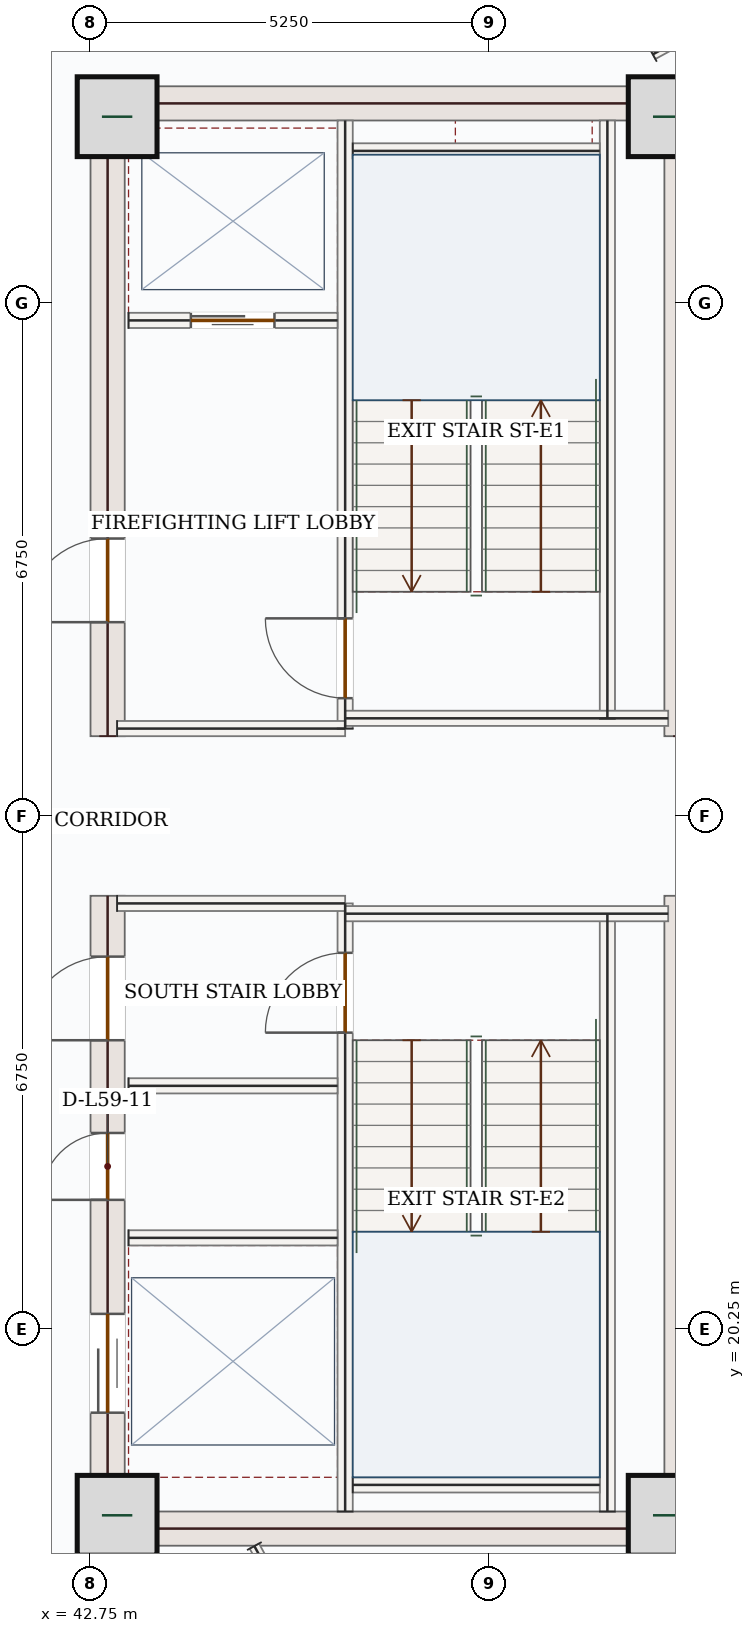
"""IFC4 building model, lengths in metres.
Left out: names, types, materials, properties, quantities, classifications, styles, units other than length and angle.
Written with IfcOpenShell. Run it as: python <this file> out.ifc"""

import sys

from ifc_helpers import new_model, si_unit, direction, frame, frame_2d, origin, origin_2d, place, context, subcontext, project, spatial, rectangle, extrude, source, transform, mapped, element, fill, save


model = new_model("IFC4")
c1 = context("Model", 3, precision=1e-05, world=origin(), true_north=direction((0.0, 1.0)))
c2 = subcontext(c1, "Body", "Model", "MODEL_VIEW")
j1 = project(units=[si_unit("LENGTHUNIT", "METRE"), si_unit("PLANEANGLEUNIT", "RADIAN")], contexts=[c1])
p1 = place(None, origin())
s1 = spatial("IfcSite", under=j1, at=p1, CompositionType="ELEMENT")
p2 = place(p1, origin())
s2 = spatial("IfcBuilding", under=s1, at=p2, CompositionType="ELEMENT")
p3 = place(p2, frame((0.0, 0.0, 250.35)))
s3 = spatial("IfcBuildingStorey", under=s2, at=p3, CompositionType="ELEMENT", Elevation=250.35)
p4 = place(p3, frame((42.975, 17.4, 0.0), z_axis=(0.0, 0.0, 1.0), x_axis=(0.0, 1.0, 0.0)))
e1 = element("IfcWall", 1, at=p4, inside=s3, PredefinedType="SHEAR", context=c2, shape_type="SweptSolid", body=[
    extrude(rectangle(XDim=8.55, YDim=0.45, at=frame_2d((4.275, 0.0))), origin(), (0.0, 0.0, 1.0), 3.5),
])
p5 = place(p4, frame((6.65, 0.0, 0.0)))
e2 = element("IfcOpeningElement", 2, at=p5, cuts=e1, PredefinedType="OPENING", context=c2, shape_type="SweptSolid", body=[
    extrude(rectangle(XDim=1.1, YDim=2.2, at=frame_2d((0.55, 1.1))), frame((0.0, 0.235, 0.0), z_axis=(0.0, -1.0, 0.0), x_axis=(1.0, 0.0, 0.0)), (0.0, 0.0, 1.0), 0.47),
])
p6 = place(p4, frame((1.75, 0.0, 0.0)))
e3 = element("IfcOpeningElement", 3, at=p6, cuts=e1, PredefinedType="OPENING", context=c2, shape_type="SweptSolid", body=[
    extrude(rectangle(XDim=1.3, YDim=2.2, at=frame_2d((0.65, 1.1))), frame((0.0, 0.235, 0.0), z_axis=(0.0, -1.0, 0.0), x_axis=(1.0, 0.0, 0.0)), (0.0, 0.0, 1.0), 0.47),
])
p7 = place(p4, frame((4.55, 0.0, 0.0)))
e4 = element("IfcOpeningElement", 4, at=p7, cuts=e1, PredefinedType="OPENING", context=c2, shape_type="SweptSolid", body=[
    extrude(rectangle(XDim=0.88, YDim=2.1, at=frame_2d((0.44, 1.05))), frame((0.0, 0.235, 0.0), z_axis=(0.0, -1.0, 0.0), x_axis=(1.0, 0.0, 0.0)), (0.0, 0.0, 1.0), 0.47),
])
p8 = place(p3, frame((42.975, 28.05, 0.0), z_axis=(0.0, 0.0, 1.0), x_axis=(0.0, 1.0, 0.0)))
e5 = element("IfcWall", 5, at=p8, inside=s3, PredefinedType="SHEAR", context=c2, shape_type="SweptSolid", body=[
    extrude(rectangle(XDim=8.55, YDim=0.45, at=frame_2d((4.275, 0.0))), origin(), (0.0, 0.0, 1.0), 3.5),
])
p9 = place(p8, frame((1.5, 0.0, 0.0)))
e6 = element("IfcOpeningElement", 6, at=p9, cuts=e5, PredefinedType="OPENING", context=c2, shape_type="SweptSolid", body=[
    extrude(rectangle(XDim=1.1, YDim=2.2, at=frame_2d((0.55, 1.1))), frame((0.0, 0.235, 0.0), z_axis=(0.0, -1.0, 0.0), x_axis=(1.0, 0.0, 0.0)), (0.0, 0.0, 1.0), 0.47),
])
m1 = source(origin(), c2, "Body", "SweptSolid", [
    extrude(rectangle(XDim=8.55, YDim=0.45, at=frame_2d((4.275, 0.0))), origin(), (0.0, 0.0, 1.0), 3.5),
])
for number, where, z_axis, x_axis in (
    (7, (50.525, 17.4, 0.0), (0.0, 0.0, 1.0), (0.0, 1.0, 0.0)),
    (8, (50.525, 28.05, 0.0), (0.0, 0.0, 1.0), (0.0, 1.0, 0.0)),
):
    element("IfcWall", number, at=place(p3, frame(where, z_axis=z_axis, x_axis=x_axis)), inside=s3, PredefinedType="SHEAR", context=c2, shape_type="MappedRepresentation", body=[
        mapped(m1, transform((0.0, 0.0, 0.0), x_axis=(1.0, 0.0, 0.0), y_axis=(0.0, 1.0, 0.0), z_axis=(0.0, 0.0, 1.0), scale=1.0)),
    ])
m2 = source(origin(), c2, "Body", "SweptSolid", [
    extrude(rectangle(XDim=7.1, YDim=0.45, at=frame_2d((3.55, 0.0))), origin(), (0.0, 0.0, 1.0), 3.5),
])
for number, where, z_axis, x_axis in (
    (9, (43.2, 17.625, 0.0), (0.0, 0.0, 1.0), (1.0, 0.0, 0.0)),
    (10, (43.2, 36.375, 0.0), (0.0, 0.0, 1.0), (1.0, 0.0, 0.0)),
):
    element("IfcWall", number, at=place(p3, frame(where, z_axis=z_axis, x_axis=x_axis)), inside=s3, PredefinedType="SHEAR", context=c2, shape_type="MappedRepresentation", body=[
        mapped(m2, transform((0.0, 0.0, 0.0), x_axis=(1.0, 0.0, 0.0), y_axis=(0.0, 1.0, 0.0), z_axis=(0.0, 0.0, 1.0), scale=1.0)),
    ])
m3 = source(origin(), c2, "Body", "SweptSolid", [
    extrude(rectangle(XDim=1.05, YDim=1.05, at=origin_2d()), origin(), (0.0, 0.0, 1.0), 3.75),
])
for number, where, z_axis, x_axis in (
    (11, (43.1, 17.8, 0.0), (0.0, 0.0, 1.0), (1.0, 0.0, 0.0)),
    (12, (50.35, 17.8, 0.0), (0.0, 0.0, 1.0), (1.0, 0.0, 0.0)),
    (13, (43.1, 36.2, 0.0), (0.0, 0.0, 1.0), (1.0, 0.0, 0.0)),
    (14, (50.35, 36.2, 0.0), (0.0, 0.0, 1.0), (1.0, 0.0, 0.0)),
):
    element("IfcColumn", number, at=place(p3, frame(where, z_axis=z_axis, x_axis=x_axis)), inside=s3, PredefinedType="COLUMN", context=c2, shape_type="MappedRepresentation", body=[
        mapped(m3, transform((0.0, 0.0, 0.0), x_axis=(1.0, 0.0, 0.0), y_axis=(0.0, 1.0, 0.0), z_axis=(0.0, 0.0, 1.0), scale=1.0)),
    ])
p10 = place(p3, frame((53.06, 18.458, 0.0), z_axis=(0.0, 0.0, 1.0), x_axis=(-0.707106781187, -0.707106781187, 0.0)))
e15 = element("IfcWall", 15, at=p10, inside=s3, PredefinedType="SOLIDWALL", context=c2, shape_type="SweptSolid", body=[
    extrude(rectangle(XDim=4.394, YDim=0.28, at=frame_2d((2.197, 0.0))), origin(), (0.0, 0.0, 1.0), 3.5),
])
p11 = place(p10, frame((1.447, 0.0, 0.85)))
e16 = element("IfcOpeningElement", 16, at=p11, cuts=e15, PredefinedType="OPENING", context=c2, shape_type="SweptSolid", body=[
    extrude(rectangle(XDim=1.5, YDim=1.5, at=frame_2d((0.75, 0.75))), frame((0.0, 0.15, 0.0), z_axis=(0.0, -1.0, 0.0), x_axis=(1.0, 0.0, 0.0)), (0.0, 0.0, 1.0), 0.3),
])
m4 = source(origin(), c2, "Body", "SweptSolid", [
    extrude(rectangle(XDim=7.87, YDim=0.2, at=frame_2d((3.935, 0.0))), origin(), (0.0, 0.0, 1.0), 3.5),
])
for number, where, z_axis, x_axis in (
    (17, (49.55, 17.85, 0.0), (0.0, 0.0, 1.0), (0.0, 1.0, 0.0)),
    (18, (49.55, 28.28, 0.0), (0.0, 0.0, 1.0), (0.0, 1.0, 0.0)),
):
    element("IfcWall", number, at=place(p3, frame(where, z_axis=z_axis, x_axis=x_axis)), inside=s3, PredefinedType="SOLIDWALL", context=c2, shape_type="MappedRepresentation", body=[
        mapped(m4, transform((0.0, 0.0, 0.0), x_axis=(1.0, 0.0, 0.0), y_axis=(0.0, 1.0, 0.0), z_axis=(0.0, 0.0, 1.0), scale=1.0)),
    ])
p12 = place(p3, frame((46.1, 17.85, 0.0), z_axis=(0.0, 0.0, 1.0), x_axis=(0.0, 1.0, 0.0)))
e19 = element("IfcWall", 19, at=p12, inside=s3, PredefinedType="SOLIDWALL", context=c2, shape_type="SweptSolid", body=[
    extrude(rectangle(XDim=8.0, YDim=0.2, at=frame_2d((4.0, 0.0))), origin(), (0.0, 0.0, 1.0), 3.5),
])
p13 = place(p12, frame((6.3, 0.0, 0.0)))
e20 = element("IfcOpeningElement", 20, at=p13, cuts=e19, PredefinedType="OPENING", context=c2, shape_type="SweptSolid", body=[
    extrude(rectangle(XDim=1.05, YDim=2.15, at=frame_2d((0.525, 1.075))), frame((0.0, 0.11, 0.0), z_axis=(0.0, -1.0, 0.0), x_axis=(1.0, 0.0, 0.0)), (0.0, 0.0, 1.0), 0.22),
])
p14 = place(p3, frame((46.1, 28.15, 0.0), z_axis=(0.0, 0.0, 1.0), x_axis=(0.0, 1.0, 0.0)))
e21 = element("IfcWall", 21, at=p14, inside=s3, PredefinedType="SOLIDWALL", context=c2, shape_type="SweptSolid", body=[
    extrude(rectangle(XDim=8.0, YDim=0.2, at=frame_2d((4.0, 0.0))), origin(), (0.0, 0.0, 1.0), 3.5),
])
p15 = place(p14, frame((0.4, 0.0, 0.0)))
e22 = element("IfcOpeningElement", 22, at=p15, cuts=e21, PredefinedType="OPENING", context=c2, shape_type="SweptSolid", body=[
    extrude(rectangle(XDim=1.05, YDim=2.15, at=frame_2d((0.525, 1.075))), frame((0.0, 0.11, 0.0), z_axis=(0.0, -1.0, 0.0), x_axis=(1.0, 0.0, 0.0)), (0.0, 0.0, 1.0), 0.22),
])
m5 = source(origin(), c2, "Body", "SweptSolid", [
    extrude(rectangle(XDim=3.0, YDim=0.2, at=frame_2d((1.5, 0.0))), origin(), (0.0, 0.0, 1.0), 3.5),
])
p16 = place(p3, frame((43.1, 25.85, 0.0), z_axis=(0.0, 0.0, 1.0), x_axis=(1.0, 0.0, 0.0)))
e23 = element("IfcWall", 23, at=p16, inside=s3, PredefinedType="SOLIDWALL", context=c2, shape_type="MappedRepresentation", body=[
    mapped(m5, transform((0.0, 0.0, 0.0), x_axis=(1.0, 0.0, 0.0), y_axis=(0.0, 1.0, 0.0), z_axis=(0.0, 0.0, 1.0), scale=1.0)),
])
m6 = source(origin(), c2, "Body", "SweptSolid", [
    extrude(rectangle(XDim=4.25, YDim=0.2, at=frame_2d((2.125, 0.0))), origin(), (0.0, 0.0, 1.0), 3.5),
])
p17 = place(p3, frame((46.1, 25.715, 0.0), z_axis=(0.0, 0.0, 1.0), x_axis=(1.0, 0.0, 0.0)))
e24 = element("IfcWall", 24, at=p17, inside=s3, PredefinedType="SOLIDWALL", context=c2, shape_type="MappedRepresentation", body=[
    mapped(m6, transform((0.0, 0.0, 0.0), x_axis=(1.0, 0.0, 0.0), y_axis=(0.0, 1.0, 0.0), z_axis=(0.0, 0.0, 1.0), scale=1.0)),
])
p18 = place(p3, frame((43.1, 28.15, 0.0), z_axis=(0.0, 0.0, 1.0), x_axis=(1.0, 0.0, 0.0)))
e25 = element("IfcWall", 25, at=p18, inside=s3, PredefinedType="SOLIDWALL", context=c2, shape_type="MappedRepresentation", body=[
    mapped(m5, transform((0.0, 0.0, 0.0), x_axis=(1.0, 0.0, 0.0), y_axis=(0.0, 1.0, 0.0), z_axis=(0.0, 0.0, 1.0), scale=1.0)),
])
p19 = place(p3, frame((46.1, 28.285, 0.0), z_axis=(0.0, 0.0, 1.0), x_axis=(1.0, 0.0, 0.0)))
e26 = element("IfcWall", 26, at=p19, inside=s3, PredefinedType="SOLIDWALL", context=c2, shape_type="MappedRepresentation", body=[
    mapped(m6, transform((0.0, 0.0, 0.0), x_axis=(1.0, 0.0, 0.0), y_axis=(0.0, 1.0, 0.0), z_axis=(0.0, 0.0, 1.0), scale=1.0)),
])
m7 = source(origin(), c2, "Body", "SweptSolid", [
    extrude(rectangle(XDim=3.25, YDim=0.2, at=frame_2d((1.625, 0.0))), origin(), (0.0, 0.0, 1.0), 3.5),
])
for number, where, z_axis, x_axis in (
    (27, (46.2, 35.75, 0.0), (0.0, 0.0, 1.0), (1.0, 0.0, 0.0)),
    (28, (46.2, 18.2, 0.0), (0.0, 0.0, 1.0), (1.0, 0.0, 0.0)),
):
    element("IfcWall", number, at=place(p3, frame(where, z_axis=z_axis, x_axis=x_axis)), inside=s3, PredefinedType="SOLIDWALL", context=c2, shape_type="MappedRepresentation", body=[
        mapped(m7, transform((0.0, 0.0, 0.0), x_axis=(1.0, 0.0, 0.0), y_axis=(0.0, 1.0, 0.0), z_axis=(0.0, 0.0, 1.0), scale=1.0)),
    ])
p20 = place(p3, frame((43.25, 33.52, 0.0), z_axis=(0.0, 0.0, 1.0), x_axis=(1.0, 0.0, 0.0)))
e29 = element("IfcWall", 29, at=p20, inside=s3, PredefinedType="SOLIDWALL", context=c2, shape_type="SweptSolid", body=[
    extrude(rectangle(XDim=2.75, YDim=0.2, at=frame_2d((1.375, 0.0))), origin(), (0.0, 0.0, 1.0), 3.5),
])
p21 = place(p20, frame((0.82, 0.0, 0.0)))
e30 = element("IfcOpeningElement", 30, at=p21, cuts=e29, PredefinedType="OPENING", context=c2, shape_type="SweptSolid", body=[
    extrude(rectangle(XDim=1.1, YDim=2.15, at=frame_2d((0.55, 1.075))), frame((0.0, 0.11, 0.0), z_axis=(0.0, -1.0, 0.0), x_axis=(1.0, 0.0, 0.0)), (0.0, 0.0, 1.0), 0.22),
])
m8 = source(origin(), c2, "Body", "SweptSolid", [
    extrude(rectangle(XDim=2.75, YDim=0.2, at=frame_2d((1.375, 0.0))), origin(), (0.0, 0.0, 1.0), 3.5),
])
for number, where, z_axis, x_axis in (
    (31, (43.25, 23.45, 0.0), (0.0, 0.0, 1.0), (1.0, 0.0, 0.0)),
    (32, (43.25, 21.45, 0.0), (0.0, 0.0, 1.0), (1.0, 0.0, 0.0)),
):
    element("IfcWall", number, at=place(p3, frame(where, z_axis=z_axis, x_axis=x_axis)), inside=s3, PredefinedType="SOLIDWALL", context=c2, shape_type="MappedRepresentation", body=[
        mapped(m8, transform((0.0, 0.0, 0.0), x_axis=(1.0, 0.0, 0.0), y_axis=(0.0, 1.0, 0.0), z_axis=(0.0, 0.0, 1.0), scale=1.0)),
    ])
m9 = source(origin(), c2, "Body", "SweptSolid", [
    extrude(rectangle(XDim=4.695, YDim=0.14, at=frame_2d((2.348, 0.0))), origin(), (0.0, 0.0, 1.0), 3.5),
])
p22 = place(p3, frame((50.148, 37.02, 0.0), z_axis=(0.0, 0.0, 1.0), x_axis=(0.877559526902, 0.479467701461, 0.0)))
e33 = element("IfcWall", 33, at=p22, inside=s3, PredefinedType="PARTITIONING", context=c2, shape_type="MappedRepresentation", body=[
    mapped(m9, transform((0.0, 0.0, 0.0), x_axis=(1.0, 0.0, 0.0), y_axis=(0.0, 1.0, 0.0), z_axis=(0.0, 0.0, 1.0), scale=1.0)),
])
p23 = place(p3, frame((44.906, 17.395, 0.0), z_axis=(0.0, 0.0, 1.0), x_axis=(0.479449534835, -0.877569452264, 0.0)))
e34 = element("IfcWall", 34, at=p23, inside=s3, PredefinedType="PARTITIONING", context=c2, shape_type="SweptSolid", body=[
    extrude(rectangle(XDim=8.216, YDim=0.14, at=frame_2d((4.108, 0.0))), origin(), (0.0, 0.0, 1.0), 3.5),
])
p24 = place(p23, frame((1.599, 0.0, 0.0)))
e35 = element("IfcOpeningElement", 35, at=p24, cuts=e34, PredefinedType="OPENING", context=c2, shape_type="SweptSolid", body=[
    extrude(rectangle(XDim=0.95, YDim=2.15, at=frame_2d((0.475, 1.075))), frame((0.0, 0.08, 0.0), z_axis=(0.0, -1.0, 0.0), x_axis=(1.0, 0.0, 0.0)), (0.0, 0.0, 1.0), 0.16),
])
m10 = source(origin(), c2, "Body", "SweptSolid", [
    extrude(rectangle(XDim=1.05, YDim=2.15, at=frame_2d((0.525, 1.075))), frame((0.0, 0.025, 0.0), z_axis=(0.0, -1.0, 0.0), x_axis=(1.0, 0.0, 0.0)), (0.0, 0.0, 1.0), 0.05),
])
p25 = place(p15, origin())
e36 = element("IfcDoor", 36, at=p25, inside=s3, OperationType="SINGLE_SWING_RIGHT", PredefinedType="DOOR", context=c2, shape_type="MappedRepresentation", body=[
    mapped(m10, transform((0.0, 0.0, 0.0), x_axis=(1.0, 0.0, 0.0), y_axis=(0.0, 1.0, 0.0), z_axis=(0.0, 0.0, 1.0), scale=1.0)),
])
fill(e22, e36)
p26 = place(p13, origin())
e37 = element("IfcDoor", 37, at=p26, inside=s3, OperationType="SINGLE_SWING_LEFT", PredefinedType="DOOR", context=c2, shape_type="MappedRepresentation", body=[
    mapped(m10, transform((0.0, 0.0, 0.0), x_axis=(1.0, 0.0, 0.0), y_axis=(0.0, 1.0, 0.0), z_axis=(0.0, 0.0, 1.0), scale=1.0)),
])
fill(e20, e37)
m11 = source(origin(), c2, "Body", "SweptSolid", [
    extrude(rectangle(XDim=1.1, YDim=2.15, at=frame_2d((0.55, 1.075))), frame((0.0, 0.025, 0.0), z_axis=(0.0, -1.0, 0.0), x_axis=(1.0, 0.0, 0.0)), (0.0, 0.0, 1.0), 0.05),
])
p27 = place(p21, origin())
e38 = element("IfcDoor", 38, at=p27, inside=s3, OperationType="DOUBLE_DOOR_SLIDING", PredefinedType="DOOR", context=c2, shape_type="MappedRepresentation", body=[
    mapped(m11, transform((0.0, 0.0, 0.0), x_axis=(1.0, 0.0, 0.0), y_axis=(0.0, 1.0, 0.0), z_axis=(0.0, 0.0, 1.0), scale=1.0)),
])
fill(e30, e38)
m12 = source(origin(), c2, "Body", "SweptSolid", [
    extrude(rectangle(XDim=1.1, YDim=2.2, at=frame_2d((0.55, 1.1))), frame((0.0, 0.025, 0.0), z_axis=(0.0, -1.0, 0.0), x_axis=(1.0, 0.0, 0.0)), (0.0, 0.0, 1.0), 0.05),
])
p28 = place(p9, origin())
e39 = element("IfcDoor", 39, at=p28, inside=s3, OperationType="SINGLE_SWING_LEFT", PredefinedType="DOOR", context=c2, shape_type="MappedRepresentation", body=[
    mapped(m12, transform((0.0, 0.0, 0.0), x_axis=(1.0, 0.0, 0.0), y_axis=(0.0, 1.0, 0.0), z_axis=(0.0, 0.0, 1.0), scale=1.0)),
])
fill(e6, e39)
p29 = place(p5, origin())
e40 = element("IfcDoor", 40, at=p29, inside=s3, OperationType="SINGLE_SWING_LEFT", PredefinedType="DOOR", context=c2, shape_type="MappedRepresentation", body=[
    mapped(m12, transform((0.0, 0.0, 0.0), x_axis=(1.0, 0.0, 0.0), y_axis=(0.0, 1.0, 0.0), z_axis=(0.0, 0.0, 1.0), scale=1.0)),
])
fill(e2, e40)
m13 = source(origin(), c2, "Body", "SweptSolid", [
    extrude(rectangle(XDim=1.3, YDim=2.2, at=frame_2d((0.65, 1.1))), frame((0.0, 0.025, 0.0), z_axis=(0.0, -1.0, 0.0), x_axis=(1.0, 0.0, 0.0)), (0.0, 0.0, 1.0), 0.05),
])
p30 = place(p6, origin())
e41 = element("IfcDoor", 41, at=p30, inside=s3, OperationType="DOUBLE_DOOR_SLIDING", PredefinedType="DOOR", context=c2, shape_type="MappedRepresentation", body=[
    mapped(m13, transform((0.0, 0.0, 0.0), x_axis=(1.0, 0.0, 0.0), y_axis=(0.0, 1.0, 0.0), z_axis=(0.0, 0.0, 1.0), scale=1.0)),
])
fill(e3, e41)
m14 = source(origin(), c2, "Body", "SweptSolid", [
    extrude(rectangle(XDim=0.88, YDim=2.1, at=frame_2d((0.44, 1.05))), frame((0.0, 0.025, 0.0), z_axis=(0.0, -1.0, 0.0), x_axis=(1.0, 0.0, 0.0)), (0.0, 0.0, 1.0), 0.05),
])
p31 = place(p7, origin())
e42 = element("IfcDoor", 42, at=p31, inside=s3, OperationType="SINGLE_SWING_LEFT", PredefinedType="DOOR", context=c2, shape_type="MappedRepresentation", body=[
    mapped(m14, transform((0.0, 0.0, 0.0), x_axis=(1.0, 0.0, 0.0), y_axis=(0.0, 1.0, 0.0), z_axis=(0.0, 0.0, 1.0), scale=1.0)),
])
fill(e4, e42)
save(model, sys.argv[1])
